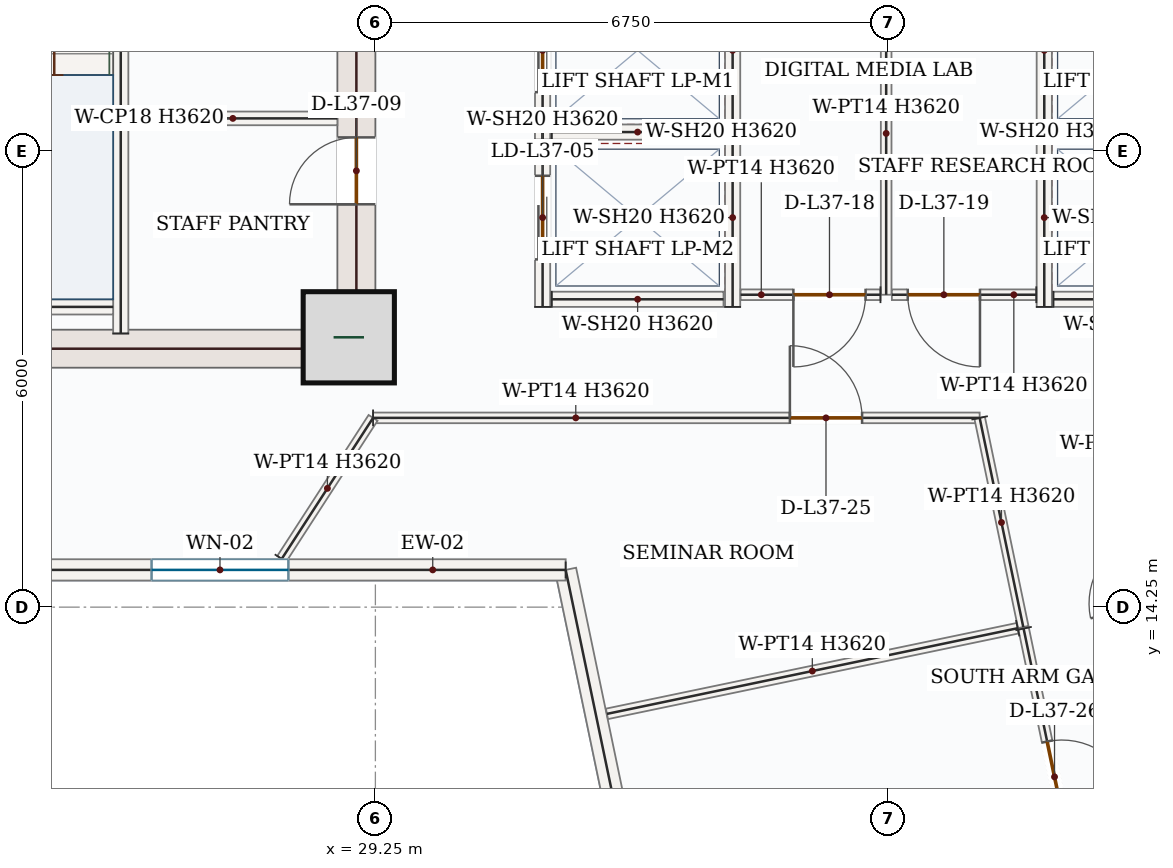
"""IFC4 building model, lengths in metres.
Left out: names, types, materials, properties, quantities, classifications, styles, units other than length and angle.
Written with IfcOpenShell. Run it as: python <this file> out.ifc"""

import sys

from ifc_helpers import new_model, si_unit, direction, frame, frame_2d, origin, origin_2d, place, context, subcontext, project, spatial, rectangle, extrude, source, transform, mapped, element, fill, save


model = new_model("IFC4")
c1 = context("Model", 3, precision=1e-05, world=origin(), true_north=direction((0.0, 1.0)))
c2 = subcontext(c1, "Body", "Model", "MODEL_VIEW")
j1 = project(units=[si_unit("LENGTHUNIT", "METRE"), si_unit("PLANEANGLEUNIT", "RADIAN")], contexts=[c1])
p1 = place(None, origin())
s1 = spatial("IfcSite", under=j1, at=p1, CompositionType="ELEMENT")
p2 = place(p1, origin())
s2 = spatial("IfcBuilding", under=s1, at=p2, CompositionType="ELEMENT")
p3 = place(p2, frame((0.0, 0.0, 162.9)))
s3 = spatial("IfcBuildingStorey", under=s2, at=p3, CompositionType="ELEMENT", Elevation=162.9)
p4 = place(p3, frame((29.0, 17.4, 0.0), z_axis=(0.0, 0.0, 1.0), x_axis=(0.0, 1.0, 0.0)))
e1 = element("IfcWall", 1, at=p4, inside=s3, PredefinedType="SHEAR", context=c2, shape_type="SweptSolid", body=[
    extrude(rectangle(XDim=8.55, YDim=0.5, at=frame_2d((4.275, 0.0))), origin(), (0.0, 0.0, 1.0), 3.62),
])
p5 = place(p4, frame((6.65, 0.0, 0.0)))
e2 = element("IfcOpeningElement", 2, at=p5, cuts=e1, PredefinedType="OPENING", context=c2, shape_type="SweptSolid", body=[
    extrude(rectangle(XDim=1.1, YDim=2.2, at=frame_2d((0.55, 1.1))), frame((0.0, 0.26, 0.0), z_axis=(0.0, -1.0, 0.0), x_axis=(1.0, 0.0, 0.0)), (0.0, 0.0, 1.0), 0.52),
])
p6 = place(p4, frame((2.15, 0.0, 0.0)))
e3 = element("IfcOpeningElement", 3, at=p6, cuts=e1, PredefinedType="OPENING", context=c2, shape_type="SweptSolid", body=[
    extrude(rectangle(XDim=0.88, YDim=2.1, at=frame_2d((0.44, 1.05))), frame((0.0, 0.26, 0.0), z_axis=(0.0, -1.0, 0.0), x_axis=(1.0, 0.0, 0.0)), (0.0, 0.0, 1.0), 0.52),
])
p7 = place(p4, frame((4.25, 0.0, 0.0)))
e4 = element("IfcOpeningElement", 4, at=p7, cuts=e1, PredefinedType="OPENING", context=c2, shape_type="SweptSolid", body=[
    extrude(rectangle(XDim=0.88, YDim=2.1, at=frame_2d((0.44, 1.05))), frame((0.0, 0.26, 0.0), z_axis=(0.0, -1.0, 0.0), x_axis=(1.0, 0.0, 0.0)), (0.0, 0.0, 1.0), 0.52),
])
m1 = source(origin(), c2, "Body", "SweptSolid", [
    extrude(rectangle(XDim=7.0, YDim=0.5, at=frame_2d((3.5, 0.0))), origin(), (0.0, 0.0, 1.0), 3.62),
])
p8 = place(p3, frame((21.75, 17.65, 0.0), z_axis=(0.0, 0.0, 1.0), x_axis=(1.0, 0.0, 0.0)))
e5 = element("IfcWall", 5, at=p8, inside=s3, PredefinedType="SHEAR", context=c2, shape_type="MappedRepresentation", body=[
    mapped(m1, transform((0.0, 0.0, 0.0), x_axis=(1.0, 0.0, 0.0), y_axis=(0.0, 1.0, 0.0), z_axis=(0.0, 0.0, 1.0), scale=1.0)),
])
m2 = source(origin(), c2, "Body", "SweptSolid", [
    extrude(rectangle(XDim=1.2, YDim=1.2, at=origin_2d()), origin(), (0.0, 0.0, 1.0), 3.9),
])
p9 = place(p3, frame((28.9, 17.8, 0.0), z_axis=(0.0, 0.0, 1.0), x_axis=(1.0, 0.0, 0.0)))
e6 = element("IfcColumn", 6, at=p9, inside=s3, PredefinedType="COLUMN", context=c2, shape_type="MappedRepresentation", body=[
    mapped(m2, transform((0.0, 0.0, 0.0), x_axis=(1.0, 0.0, 0.0), y_axis=(0.0, 1.0, 0.0), z_axis=(0.0, 0.0, 1.0), scale=1.0)),
])
p10 = place(p3, frame((33.433, 6.688, 0.0), z_axis=(0.0, 0.0, 1.0), x_axis=(-0.204152195211, 0.978939161128, 0.0)))
e7 = element("IfcWall", 7, at=p10, inside=s3, PredefinedType="SOLIDWALL", context=c2, shape_type="SweptSolid", body=[
    extrude(rectangle(XDim=8.225, YDim=0.28, at=frame_2d((4.113, 0.0))), origin(), (0.0, 0.0, 1.0), 3.62),
])
p11 = place(p10, frame((3.213, 0.0, 0.85)))
e8 = element("IfcOpeningElement", 8, at=p11, cuts=e7, PredefinedType="OPENING", context=c2, shape_type="SweptSolid", body=[
    extrude(rectangle(XDim=1.8, YDim=1.75, at=frame_2d((0.9, 0.875))), frame((0.0, 0.15, 0.0), z_axis=(0.0, -1.0, 0.0), x_axis=(1.0, 0.0, 0.0)), (0.0, 0.0, 1.0), 0.3),
])
p12 = place(p3, frame((31.753, 14.74, 0.0), z_axis=(0.0, 0.0, 1.0), x_axis=(-1.0, 0.0, 0.0)))
e9 = element("IfcWall", 9, at=p12, inside=s3, PredefinedType="SOLIDWALL", context=c2, shape_type="SweptSolid", body=[
    extrude(rectangle(XDim=9.095, YDim=0.28, at=frame_2d((4.548, 0.0))), origin(), (0.0, 0.0, 1.0), 3.62),
])
p13 = place(p12, frame((3.648, 0.0, 0.85)))
e10 = element("IfcOpeningElement", 10, at=p13, cuts=e9, PredefinedType="OPENING", context=c2, shape_type="SweptSolid", body=[
    extrude(rectangle(XDim=1.8, YDim=1.75, at=frame_2d((0.9, 0.875))), frame((0.0, 0.15, 0.0), z_axis=(0.0, -1.0, 0.0), x_axis=(1.0, 0.0, 0.0)), (0.0, 0.0, 1.0), 0.3),
])
p14 = place(p3, frame((25.9, 17.85, 0.0), z_axis=(0.0, 0.0, 1.0), x_axis=(0.0, 1.0, 0.0)))
e11 = element("IfcWall", 11, at=p14, inside=s3, PredefinedType="SOLIDWALL", context=c2, shape_type="SweptSolid", body=[
    extrude(rectangle(XDim=8.0, YDim=0.2, at=frame_2d((4.0, 0.0))), origin(), (0.0, 0.0, 1.0), 3.62),
])
p15 = place(p14, frame((6.3, 0.0, 0.0)))
e12 = element("IfcOpeningElement", 12, at=p15, cuts=e11, PredefinedType="OPENING", context=c2, shape_type="SweptSolid", body=[
    extrude(rectangle(XDim=1.05, YDim=2.15, at=frame_2d((0.525, 1.075))), frame((0.0, 0.11, 0.0), z_axis=(0.0, -1.0, 0.0), x_axis=(1.0, 0.0, 0.0)), (0.0, 0.0, 1.0), 0.22),
])
m3 = source(origin(), c2, "Body", "SweptSolid", [
    extrude(rectangle(XDim=3.25, YDim=0.2, at=frame_2d((1.625, 0.0))), origin(), (0.0, 0.0, 1.0), 3.62),
])
p16 = place(p3, frame((22.55, 18.2, 0.0), z_axis=(0.0, 0.0, 1.0), x_axis=(1.0, 0.0, 0.0)))
e13 = element("IfcWall", 13, at=p16, inside=s3, PredefinedType="SOLIDWALL", context=c2, shape_type="MappedRepresentation", body=[
    mapped(m3, transform((0.0, 0.0, 0.0), x_axis=(1.0, 0.0, 0.0), y_axis=(0.0, 1.0, 0.0), z_axis=(0.0, 0.0, 1.0), scale=1.0)),
])
m4 = source(origin(), c2, "Body", "SweptSolid", [
    extrude(rectangle(XDim=2.75, YDim=0.18, at=frame_2d((1.375, 0.0))), origin(), (0.0, 0.0, 1.0), 3.62),
])
p17 = place(p3, frame((26.0, 20.68, 0.0), z_axis=(0.0, 0.0, 1.0), x_axis=(1.0, 0.0, 0.0)))
e14 = element("IfcWall", 14, at=p17, inside=s3, PredefinedType="PARTITIONING", context=c2, shape_type="MappedRepresentation", body=[
    mapped(m4, transform((0.0, 0.0, 0.0), x_axis=(1.0, 0.0, 0.0), y_axis=(0.0, 1.0, 0.0), z_axis=(0.0, 0.0, 1.0), scale=1.0)),
])
p18 = place(p3, frame((31.45, 20.4, 0.0), z_axis=(0.0, 0.0, 1.0), x_axis=(0.0, 1.0, 0.0)))
e15 = element("IfcWall", 15, at=p18, inside=s3, PredefinedType="SOLIDWALL", context=c2, shape_type="SweptSolid", body=[
    extrude(rectangle(XDim=2.35, YDim=0.2, at=frame_2d((1.175, 0.0))), origin(), (0.0, 0.0, 1.0), 3.62),
])
p19 = place(p18, frame((0.625, 0.0, 0.0)))
e16 = element("IfcOpeningElement", 16, at=p19, cuts=e15, PredefinedType="OPENING", context=c2, shape_type="SweptSolid", body=[
    extrude(rectangle(XDim=1.1, YDim=2.15, at=frame_2d((0.55, 1.075))), frame((0.0, 0.11, 0.0), z_axis=(0.0, -1.0, 0.0), x_axis=(1.0, 0.0, 0.0)), (0.0, 0.0, 1.0), 0.22),
])
m5 = source(origin(), c2, "Body", "SweptSolid", [
    extrude(rectangle(XDim=2.35, YDim=0.2, at=frame_2d((1.175, 0.0))), origin(), (0.0, 0.0, 1.0), 3.62),
])
p20 = place(p3, frame((33.95, 20.4, 0.0), z_axis=(0.0, 0.0, 1.0), x_axis=(0.0, 1.0, 0.0)))
e17 = element("IfcWall", 17, at=p20, inside=s3, PredefinedType="SOLIDWALL", context=c2, shape_type="MappedRepresentation", body=[
    mapped(m5, transform((0.0, 0.0, 0.0), x_axis=(1.0, 0.0, 0.0), y_axis=(0.0, 1.0, 0.0), z_axis=(0.0, 0.0, 1.0), scale=1.0)),
])
m6 = source(origin(), c2, "Body", "SweptSolid", [
    extrude(rectangle(XDim=2.26, YDim=0.2, at=frame_2d((1.13, 0.0))), origin(), (0.0, 0.0, 1.0), 3.62),
])
p21 = place(p3, frame((31.57, 20.5, 0.0), z_axis=(0.0, 0.0, 1.0), x_axis=(1.0, 0.0, 0.0)))
e18 = element("IfcWall", 18, at=p21, inside=s3, PredefinedType="SOLIDWALL", context=c2, shape_type="MappedRepresentation", body=[
    mapped(m6, transform((0.0, 0.0, 0.0), x_axis=(1.0, 0.0, 0.0), y_axis=(0.0, 1.0, 0.0), z_axis=(0.0, 0.0, 1.0), scale=1.0)),
])
p22 = place(p3, frame((31.45, 18.2, 0.0), z_axis=(0.0, 0.0, 1.0), x_axis=(0.0, 1.0, 0.0)))
e19 = element("IfcWall", 19, at=p22, inside=s3, PredefinedType="SOLIDWALL", context=c2, shape_type="SweptSolid", body=[
    extrude(rectangle(XDim=2.35, YDim=0.2, at=frame_2d((1.175, 0.0))), origin(), (0.0, 0.0, 1.0), 3.62),
])
p23 = place(p22, frame((0.625, 0.0, 0.0)))
e20 = element("IfcOpeningElement", 20, at=p23, cuts=e19, PredefinedType="OPENING", context=c2, shape_type="SweptSolid", body=[
    extrude(rectangle(XDim=1.1, YDim=2.15, at=frame_2d((0.55, 1.075))), frame((0.0, 0.11, 0.0), z_axis=(0.0, -1.0, 0.0), x_axis=(1.0, 0.0, 0.0)), (0.0, 0.0, 1.0), 0.22),
])
p24 = place(p3, frame((33.95, 18.2, 0.0), z_axis=(0.0, 0.0, 1.0), x_axis=(0.0, 1.0, 0.0)))
e21 = element("IfcWall", 21, at=p24, inside=s3, PredefinedType="SOLIDWALL", context=c2, shape_type="MappedRepresentation", body=[
    mapped(m5, transform((0.0, 0.0, 0.0), x_axis=(1.0, 0.0, 0.0), y_axis=(0.0, 1.0, 0.0), z_axis=(0.0, 0.0, 1.0), scale=1.0)),
])
p25 = place(p3, frame((31.57, 18.3, 0.0), z_axis=(0.0, 0.0, 1.0), x_axis=(1.0, 0.0, 0.0)))
e22 = element("IfcWall", 22, at=p25, inside=s3, PredefinedType="SOLIDWALL", context=c2, shape_type="MappedRepresentation", body=[
    mapped(m6, transform((0.0, 0.0, 0.0), x_axis=(1.0, 0.0, 0.0), y_axis=(0.0, 1.0, 0.0), z_axis=(0.0, 0.0, 1.0), scale=1.0)),
])
p26 = place(p3, frame((38.05, 20.4, 0.0), z_axis=(0.0, 0.0, 1.0), x_axis=(0.0, 1.0, 0.0)))
e23 = element("IfcWall", 23, at=p26, inside=s3, PredefinedType="SOLIDWALL", context=c2, shape_type="MappedRepresentation", body=[
    mapped(m5, transform((0.0, 0.0, 0.0), x_axis=(1.0, 0.0, 0.0), y_axis=(0.0, 1.0, 0.0), z_axis=(0.0, 0.0, 1.0), scale=1.0)),
])
p27 = place(p3, frame((38.17, 20.5, 0.0), z_axis=(0.0, 0.0, 1.0), x_axis=(1.0, 0.0, 0.0)))
e24 = element("IfcWall", 24, at=p27, inside=s3, PredefinedType="SOLIDWALL", context=c2, shape_type="MappedRepresentation", body=[
    mapped(m6, transform((0.0, 0.0, 0.0), x_axis=(1.0, 0.0, 0.0), y_axis=(0.0, 1.0, 0.0), z_axis=(0.0, 0.0, 1.0), scale=1.0)),
])
p28 = place(p3, frame((38.05, 18.2, 0.0), z_axis=(0.0, 0.0, 1.0), x_axis=(0.0, 1.0, 0.0)))
e25 = element("IfcWall", 25, at=p28, inside=s3, PredefinedType="SOLIDWALL", context=c2, shape_type="MappedRepresentation", body=[
    mapped(m5, transform((0.0, 0.0, 0.0), x_axis=(1.0, 0.0, 0.0), y_axis=(0.0, 1.0, 0.0), z_axis=(0.0, 0.0, 1.0), scale=1.0)),
])
p29 = place(p3, frame((38.17, 18.3, 0.0), z_axis=(0.0, 0.0, 1.0), x_axis=(1.0, 0.0, 0.0)))
e26 = element("IfcWall", 26, at=p29, inside=s3, PredefinedType="SOLIDWALL", context=c2, shape_type="MappedRepresentation", body=[
    mapped(m6, transform((0.0, 0.0, 0.0), x_axis=(1.0, 0.0, 0.0), y_axis=(0.0, 1.0, 0.0), z_axis=(0.0, 0.0, 1.0), scale=1.0)),
])
m7 = source(origin(), c2, "Body", "SweptSolid", [
    extrude(rectangle(XDim=4.245, YDim=0.14, at=frame_2d((2.123, 0.0))), origin(), (0.0, 0.0, 1.0), 3.62),
])
p30 = place(p3, frame((35.97, 22.605, 0.0), z_axis=(0.0, 0.0, 1.0), x_axis=(0.0, -1.0, 0.0)))
e27 = element("IfcWall", 27, at=p30, inside=s3, PredefinedType="PARTITIONING", context=c2, shape_type="MappedRepresentation", body=[
    mapped(m7, transform((0.0, 0.0, 0.0), x_axis=(1.0, 0.0, 0.0), y_axis=(0.0, 1.0, 0.0), z_axis=(0.0, 0.0, 1.0), scale=1.0)),
])
p31 = place(p3, frame((35.895, 18.36, 0.0), z_axis=(0.0, 0.0, 1.0), x_axis=(-1.0, 0.0, 0.0)))
e28 = element("IfcWall", 28, at=p31, inside=s3, PredefinedType="PARTITIONING", context=c2, shape_type="SweptSolid", body=[
    extrude(rectangle(XDim=1.84, YDim=0.14, at=frame_2d((0.92, 0.0))), origin(), (0.0, 0.0, 1.0), 3.62),
])
p32 = place(p31, frame((0.196, 0.0, 0.0)))
e29 = element("IfcOpeningElement", 29, at=p32, cuts=e28, PredefinedType="OPENING", context=c2, shape_type="SweptSolid", body=[
    extrude(rectangle(XDim=0.95, YDim=2.15, at=frame_2d((0.475, 1.075))), frame((0.0, 0.08, 0.0), z_axis=(0.0, -1.0, 0.0), x_axis=(1.0, 0.0, 0.0)), (0.0, 0.0, 1.0), 0.16),
])
p33 = place(p3, frame((37.945, 18.36, 0.0), z_axis=(0.0, 0.0, 1.0), x_axis=(-1.0, 0.0, 0.0)))
e30 = element("IfcWall", 30, at=p33, inside=s3, PredefinedType="PARTITIONING", context=c2, shape_type="SweptSolid", body=[
    extrude(rectangle(XDim=1.9, YDim=0.14, at=frame_2d((0.95, 0.0))), origin(), (0.0, 0.0, 1.0), 3.62),
])
p34 = place(p33, frame((0.741, 0.0, 0.0)))
e31 = element("IfcOpeningElement", 31, at=p34, cuts=e30, PredefinedType="OPENING", context=c2, shape_type="SweptSolid", body=[
    extrude(rectangle(XDim=0.95, YDim=2.15, at=frame_2d((0.475, 1.075))), frame((0.0, 0.08, 0.0), z_axis=(0.0, -1.0, 0.0), x_axis=(1.0, 0.0, 0.0)), (0.0, 0.0, 1.0), 0.16),
])
p35 = place(p3, frame((29.219, 16.74, 0.0), z_axis=(0.0, 0.0, 1.0), x_axis=(1.0, 0.0, 0.0)))
e32 = element("IfcWall", 32, at=p35, inside=s3, PredefinedType="PARTITIONING", context=c2, shape_type="SweptSolid", body=[
    extrude(rectangle(XDim=7.98, YDim=0.14, at=frame_2d((3.99, 0.0))), origin(), (0.0, 0.0, 1.0), 3.62),
])
p36 = place(p35, frame((5.484, 0.0, 0.0)))
e33 = element("IfcOpeningElement", 33, at=p36, cuts=e32, PredefinedType="OPENING", context=c2, shape_type="SweptSolid", body=[
    extrude(rectangle(XDim=0.95, YDim=2.15, at=frame_2d((0.475, 1.075))), frame((0.0, 0.08, 0.0), z_axis=(0.0, -1.0, 0.0), x_axis=(1.0, 0.0, 0.0)), (0.0, 0.0, 1.0), 0.16),
])
m8 = source(origin(), c2, "Body", "SweptSolid", [
    extrude(rectangle(XDim=2.811, YDim=0.14, at=frame_2d((1.406, 0.0))), origin(), (0.0, 0.0, 1.0), 3.62),
])
p37 = place(p3, frame((37.2, 16.74, 0.0), z_axis=(0.0, 0.0, 1.0), x_axis=(0.204092977776, -0.978951508719, 0.0)))
e34 = element("IfcWall", 34, at=p37, inside=s3, PredefinedType="PARTITIONING", context=c2, shape_type="MappedRepresentation", body=[
    mapped(m8, transform((0.0, 0.0, 0.0), x_axis=(1.0, 0.0, 0.0), y_axis=(0.0, 1.0, 0.0), z_axis=(0.0, 0.0, 1.0), scale=1.0)),
])
m9 = source(origin(), c2, "Body", "SweptSolid", [
    extrude(rectangle(XDim=5.52, YDim=0.14, at=frame_2d((2.76, 0.0))), origin(), (0.0, 0.0, 1.0), 3.62),
])
p38 = place(p3, frame((37.7, 13.973, 0.0), z_axis=(0.0, 0.0, 1.0), x_axis=(-0.978929612498, -0.204197976909, 0.0)))
e35 = element("IfcWall", 35, at=p38, inside=s3, PredefinedType="PARTITIONING", context=c2, shape_type="MappedRepresentation", body=[
    mapped(m9, transform((0.0, 0.0, 0.0), x_axis=(1.0, 0.0, 0.0), y_axis=(0.0, 1.0, 0.0), z_axis=(0.0, 0.0, 1.0), scale=1.0)),
])
m10 = source(origin(), c2, "Body", "SweptSolid", [
    extrude(rectangle(XDim=2.21, YDim=0.14, at=frame_2d((1.105, 0.0))), origin(), (0.0, 0.0, 1.0), 3.62),
])
p39 = place(p3, frame((28.018, 14.885, 0.0), z_axis=(0.0, 0.0, 1.0), x_axis=(0.543613077793, 0.83933594088, 0.0)))
e36 = element("IfcWall", 36, at=p39, inside=s3, PredefinedType="PARTITIONING", context=c2, shape_type="MappedRepresentation", body=[
    mapped(m10, transform((0.0, 0.0, 0.0), x_axis=(1.0, 0.0, 0.0), y_axis=(0.0, 1.0, 0.0), z_axis=(0.0, 0.0, 1.0), scale=1.0)),
])
p40 = place(p3, frame((37.778, 13.969, 0.0), z_axis=(0.0, 0.0, 1.0), x_axis=(0.204175249208, -0.978934353065, 0.0)))
e37 = element("IfcWall", 37, at=p40, inside=s3, PredefinedType="PARTITIONING", context=c2, shape_type="SweptSolid", body=[
    extrude(rectangle(XDim=7.853, YDim=0.14, at=frame_2d((3.926, 0.0))), origin(), (0.0, 0.0, 1.0), 3.62),
])
p41 = place(p40, frame((1.519, 0.0, 0.0)))
e38 = element("IfcOpeningElement", 38, at=p41, cuts=e37, PredefinedType="OPENING", context=c2, shape_type="SweptSolid", body=[
    extrude(rectangle(XDim=0.95, YDim=2.15, at=frame_2d((0.475, 1.075))), frame((0.0, 0.08, 0.0), z_axis=(0.0, -1.0, 0.0), x_axis=(1.0, 0.0, 0.0)), (0.0, 0.0, 1.0), 0.16),
])
m11 = source(origin(), c2, "Body", "SweptSolid", [
    extrude(rectangle(XDim=1.8, YDim=1.75, at=frame_2d((0.9, 0.875))), frame((0.0, 0.03, 0.0), z_axis=(0.0, -1.0, 0.0), x_axis=(1.0, 0.0, 0.0)), (0.0, 0.0, 1.0), 0.06),
])
p42 = place(p13, origin())
e39 = element("IfcWindow", 39, at=p42, inside=s3, PartitioningType="DOUBLE_PANEL_VERTICAL", PredefinedType="WINDOW", context=c2, shape_type="MappedRepresentation", body=[
    mapped(m11, transform((0.0, 0.0, 0.0), x_axis=(1.0, 0.0, 0.0), y_axis=(0.0, 1.0, 0.0), z_axis=(0.0, 0.0, 1.0), scale=1.0)),
])
fill(e10, e39)
m12 = source(origin(), c2, "Body", "SweptSolid", [
    extrude(rectangle(XDim=0.88, YDim=2.1, at=frame_2d((0.44, 1.05))), frame((0.0, 0.025, 0.0), z_axis=(0.0, -1.0, 0.0), x_axis=(1.0, 0.0, 0.0)), (0.0, 0.0, 1.0), 0.05),
])
p43 = place(p6, origin())
e40 = element("IfcDoor", 40, at=p43, inside=s3, OperationType="SINGLE_SWING_LEFT", PredefinedType="DOOR", context=c2, shape_type="MappedRepresentation", body=[
    mapped(m12, transform((0.0, 0.0, 0.0), x_axis=(1.0, 0.0, 0.0), y_axis=(0.0, 1.0, 0.0), z_axis=(0.0, 0.0, 1.0), scale=1.0)),
])
fill(e3, e40)
m13 = source(origin(), c2, "Body", "SweptSolid", [
    extrude(rectangle(XDim=1.1, YDim=2.15, at=frame_2d((0.55, 1.075))), frame((0.0, 0.025, 0.0), z_axis=(0.0, -1.0, 0.0), x_axis=(1.0, 0.0, 0.0)), (0.0, 0.0, 1.0), 0.05),
])
p44 = place(p19, origin())
e41 = element("IfcDoor", 41, at=p44, inside=s3, OperationType="DOUBLE_DOOR_SLIDING", PredefinedType="DOOR", context=c2, shape_type="MappedRepresentation", body=[
    mapped(m13, transform((0.0, 0.0, 0.0), x_axis=(1.0, 0.0, 0.0), y_axis=(0.0, 1.0, 0.0), z_axis=(0.0, 0.0, 1.0), scale=1.0)),
])
fill(e16, e41)
p45 = place(p23, origin())
e42 = element("IfcDoor", 42, at=p45, inside=s3, OperationType="DOUBLE_DOOR_SLIDING", PredefinedType="DOOR", context=c2, shape_type="MappedRepresentation", body=[
    mapped(m13, transform((0.0, 0.0, 0.0), x_axis=(1.0, 0.0, 0.0), y_axis=(0.0, 1.0, 0.0), z_axis=(0.0, 0.0, 1.0), scale=1.0)),
])
fill(e20, e42)
m14 = source(origin(), c2, "Body", "SweptSolid", [
    extrude(rectangle(XDim=0.95, YDim=2.15, at=frame_2d((0.475, 1.075))), frame((0.0, 0.025, 0.0), z_axis=(0.0, -1.0, 0.0), x_axis=(1.0, 0.0, 0.0)), (0.0, 0.0, 1.0), 0.05),
])
p46 = place(p32, origin())
e43 = element("IfcDoor", 43, at=p46, inside=s3, OperationType="SINGLE_SWING_RIGHT", PredefinedType="DOOR", context=c2, shape_type="MappedRepresentation", body=[
    mapped(m14, transform((0.0, 0.0, 0.0), x_axis=(1.0, 0.0, 0.0), y_axis=(0.0, 1.0, 0.0), z_axis=(0.0, 0.0, 1.0), scale=1.0)),
])
fill(e29, e43)
p47 = place(p34, origin())
e44 = element("IfcDoor", 44, at=p47, inside=s3, OperationType="SINGLE_SWING_LEFT", PredefinedType="DOOR", context=c2, shape_type="MappedRepresentation", body=[
    mapped(m14, transform((0.0, 0.0, 0.0), x_axis=(1.0, 0.0, 0.0), y_axis=(0.0, 1.0, 0.0), z_axis=(0.0, 0.0, 1.0), scale=1.0)),
])
fill(e31, e44)
p48 = place(p36, origin())
e45 = element("IfcDoor", 45, at=p48, inside=s3, OperationType="SINGLE_SWING_LEFT", PredefinedType="DOOR", context=c2, shape_type="MappedRepresentation", body=[
    mapped(m14, transform((0.0, 0.0, 0.0), x_axis=(1.0, 0.0, 0.0), y_axis=(0.0, 1.0, 0.0), z_axis=(0.0, 0.0, 1.0), scale=1.0)),
])
fill(e33, e45)
p49 = place(p41, origin())
e46 = element("IfcDoor", 46, at=p49, inside=s3, OperationType="SINGLE_SWING_RIGHT", PredefinedType="DOOR", context=c2, shape_type="MappedRepresentation", body=[
    mapped(m14, transform((0.0, 0.0, 0.0), x_axis=(1.0, 0.0, 0.0), y_axis=(0.0, 1.0, 0.0), z_axis=(0.0, 0.0, 1.0), scale=1.0)),
])
fill(e38, e46)
save(model, sys.argv[1])
